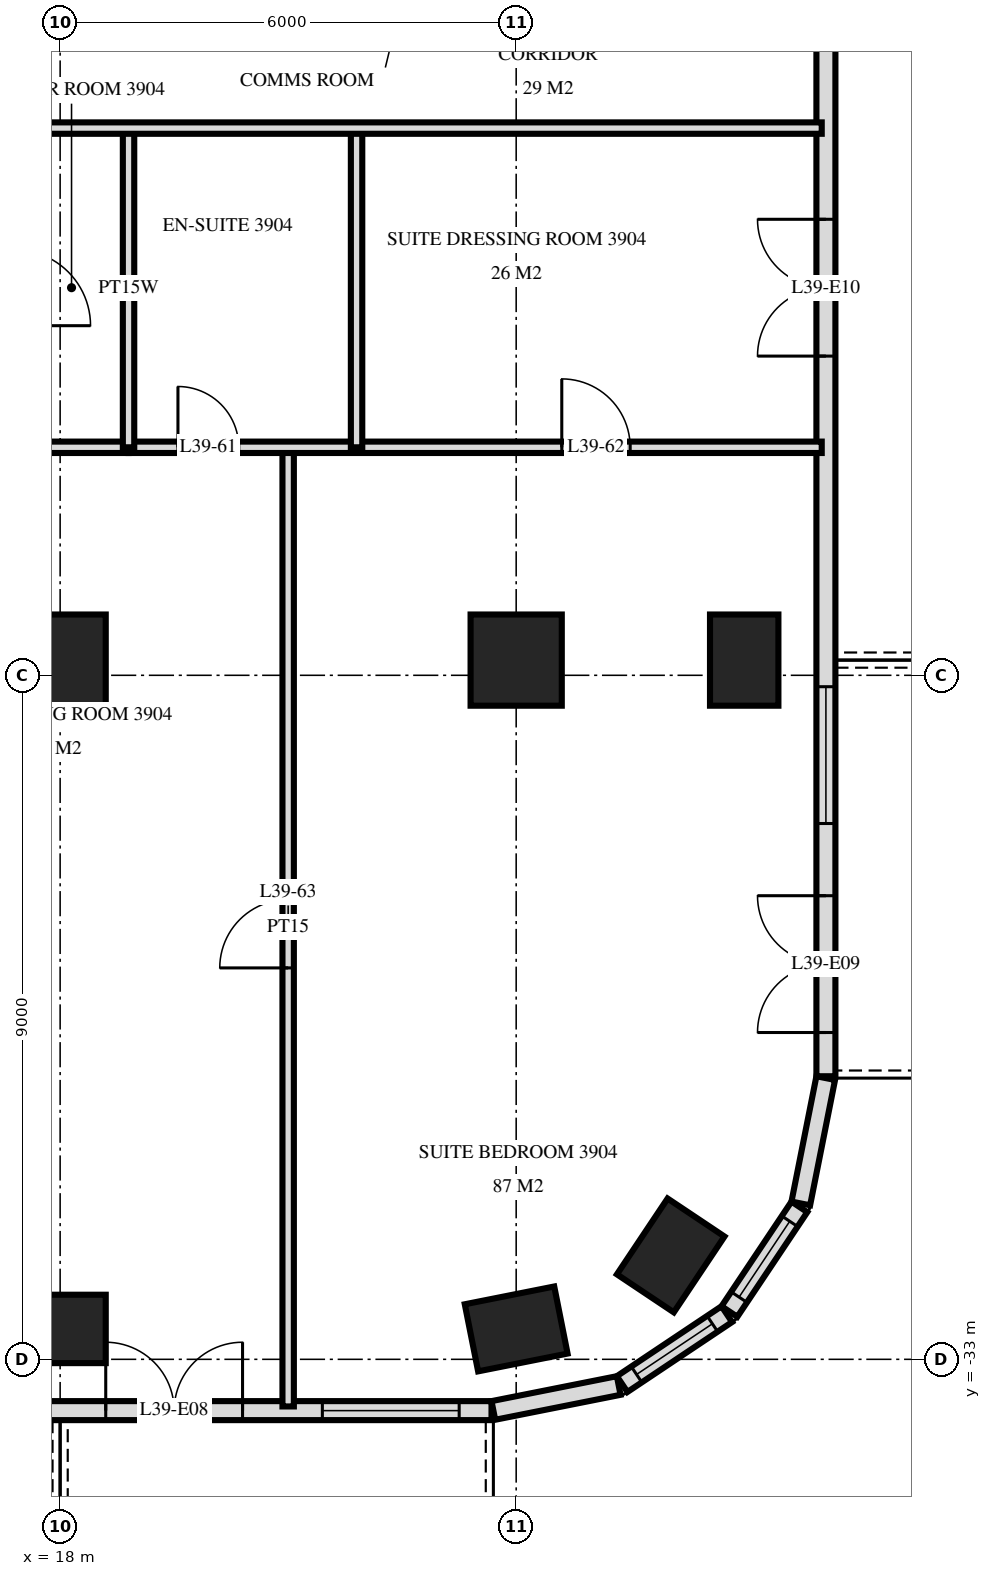
"""IFC4 building model, lengths in metres.
Left out: names, types, materials, properties, quantities, classifications, styles, units other than length and angle.
Written with IfcOpenShell. Run it as: python <this file> out.ifc"""

import sys

from ifc_helpers import new_model, si_unit, direction, frame, frame_2d, origin, origin_2d, place, context, subcontext, project, spatial, rectangle, extrude, element, fill, save


model = new_model("IFC4")
c1 = context("Model", 3, precision=1e-05, world=origin(), true_north=direction((0.0, 1.0)))
c2 = subcontext(c1, "Body", "Model", "MODEL_VIEW")
j1 = project(units=[si_unit("LENGTHUNIT", "METRE"), si_unit("PLANEANGLEUNIT", "RADIAN")], contexts=[c1])
p1 = place(None, origin())
s1 = spatial("IfcSite", under=j1, at=p1, CompositionType="ELEMENT")
p2 = place(p1, origin())
s2 = spatial("IfcBuilding", under=s1, at=p2, CompositionType="ELEMENT")
p3 = place(p2, frame((0.0, 0.0, 152.4)))
s3 = spatial("IfcBuildingStorey", under=s2, at=p3, CompositionType="ELEMENT", Elevation=152.4)
p4 = place(p3, frame((18.0, -32.6, 0.0), z_axis=(0.0, 0.0, 1.0), x_axis=(1.0, 0.0, 0.0)))
e1 = element("IfcColumn", 1, at=p4, inside=s3, PredefinedType="COLUMN", context=c2, shape_type="SweptSolid", body=[
    extrude(rectangle(XDim=1.2, YDim=0.9, at=origin_2d()), origin(), (0.0, 0.0, 1.0), 3.6),
])
p5 = place(p3, frame((18.0, -23.8, 0.0), z_axis=(0.0, 0.0, 1.0), x_axis=(1.0, 0.0, 0.0)))
e2 = element("IfcColumn", 2, at=p5, inside=s3, PredefinedType="COLUMN", context=c2, shape_type="SweptSolid", body=[
    extrude(rectangle(XDim=1.2, YDim=1.2, at=origin_2d()), origin(), (0.0, 0.0, 1.0), 3.6),
])
p6 = place(p3, frame((24.0, -32.6, 0.0), z_axis=(0.0, 0.0, 1.0), x_axis=(0.980792089743, 0.195056086032, 0.0)))
e3 = element("IfcColumn", 3, at=p6, inside=s3, PredefinedType="COLUMN", context=c2, shape_type="SweptSolid", body=[
    extrude(rectangle(XDim=1.2, YDim=0.9, at=origin_2d()), origin(), (0.0, 0.0, 1.0), 3.6),
])
p7 = place(p3, frame((24.0, -23.8, 0.0), z_axis=(0.0, 0.0, 1.0), x_axis=(1.0, 0.0, 0.0)))
e4 = element("IfcColumn", 4, at=p7, inside=s3, PredefinedType="COLUMN", context=c2, shape_type="SweptSolid", body=[
    extrude(rectangle(XDim=1.2, YDim=1.2, at=origin_2d()), origin(), (0.0, 0.0, 1.0), 3.6),
])
for number, where, z_axis, x_axis in (
    (5, (26.033, -31.633, 0.0), (0.0, 0.0, 1.0), (0.556, 0.831, 0.0)),
    (6, (27.0, -23.8, 0.0), (0.0, 0.0, 1.0), (0.0, 1.0, 0.0)),
):
    element("IfcColumn", number, at=place(p3, frame(where, z_axis=z_axis, x_axis=x_axis)), inside=s3, PredefinedType="COLUMN", context=c2, shape_type="SweptSolid", body=[
        extrude(rectangle(XDim=1.2, YDim=0.9, at=origin_2d()), origin(), (0.0, 0.0, 1.0), 3.6),
    ])
p8 = place(p3, frame((-23.675, -33.675, 0.0), z_axis=(0.0, 0.0, 1.0), x_axis=(1.0, 0.0, 0.0)))
e7 = element("IfcWall", 7, at=p8, inside=s3, PredefinedType="SOLIDWALL", context=c2, shape_type="SweptSolid", body=[
    extrude(rectangle(XDim=47.351, YDim=0.25, at=frame_2d((23.675, 0.0))), origin(), (0.0, 0.0, 1.0), 3.32),
])
p9 = place(p8, frame((3.425, 0.0, 0.0)))
e8 = element("IfcOpeningElement", 8, at=p9, cuts=e7, PredefinedType="OPENING", context=c2, shape_type="SweptSolid", body=[
    extrude(rectangle(XDim=1.8, YDim=2.4, at=frame_2d((0.9, 1.2))), frame((0.0, 0.135, 0.0), z_axis=(0.0, -1.0, 0.0), x_axis=(1.0, 0.0, 0.0)), (0.0, 0.0, 1.0), 0.27),
])
p10 = place(p8, frame((6.275, 0.0, 0.0)))
e9 = element("IfcOpeningElement", 9, at=p10, cuts=e7, PredefinedType="OPENING", context=c2, shape_type="SweptSolid", body=[
    extrude(rectangle(XDim=1.8, YDim=2.4, at=frame_2d((0.9, 1.2))), frame((0.0, 0.135, 0.0), z_axis=(0.0, -1.0, 0.0), x_axis=(1.0, 0.0, 0.0)), (0.0, 0.0, 1.0), 0.27),
])
p11 = place(p8, frame((8.975, 0.0, 0.3)))
e10 = element("IfcOpeningElement", 10, at=p11, cuts=e7, PredefinedType="OPENING", context=c2, shape_type="SweptSolid", body=[
    extrude(rectangle(XDim=2.4, YDim=2.1, at=frame_2d((1.2, 1.05))), frame((0.0, 0.135, 0.0), z_axis=(0.0, -1.0, 0.0), x_axis=(1.0, 0.0, 0.0)), (0.0, 0.0, 1.0), 0.27),
])
p12 = place(p8, frame((12.275, 0.0, 0.0)))
e11 = element("IfcOpeningElement", 11, at=p12, cuts=e7, PredefinedType="OPENING", context=c2, shape_type="SweptSolid", body=[
    extrude(rectangle(XDim=1.8, YDim=2.4, at=frame_2d((0.9, 1.2))), frame((0.0, 0.135, 0.0), z_axis=(0.0, -1.0, 0.0), x_axis=(1.0, 0.0, 0.0)), (0.0, 0.0, 1.0), 0.27),
])
p13 = place(p8, frame((14.975, 0.0, 0.3)))
e12 = element("IfcOpeningElement", 12, at=p13, cuts=e7, PredefinedType="OPENING", context=c2, shape_type="SweptSolid", body=[
    extrude(rectangle(XDim=2.4, YDim=2.1, at=frame_2d((1.2, 1.05))), frame((0.0, 0.135, 0.0), z_axis=(0.0, -1.0, 0.0), x_axis=(1.0, 0.0, 0.0)), (0.0, 0.0, 1.0), 0.27),
])
p14 = place(p8, frame((21.275, 0.0, 0.0)))
e13 = element("IfcOpeningElement", 13, at=p14, cuts=e7, PredefinedType="OPENING", context=c2, shape_type="SweptSolid", body=[
    extrude(rectangle(XDim=1.8, YDim=2.4, at=frame_2d((0.9, 1.2))), frame((0.0, 0.135, 0.0), z_axis=(0.0, -1.0, 0.0), x_axis=(1.0, 0.0, 0.0)), (0.0, 0.0, 1.0), 0.27),
])
p15 = place(p8, frame((24.275, 0.0, 0.0)))
e14 = element("IfcOpeningElement", 14, at=p15, cuts=e7, PredefinedType="OPENING", context=c2, shape_type="SweptSolid", body=[
    extrude(rectangle(XDim=1.8, YDim=2.4, at=frame_2d((0.9, 1.2))), frame((0.0, 0.135, 0.0), z_axis=(0.0, -1.0, 0.0), x_axis=(1.0, 0.0, 0.0)), (0.0, 0.0, 1.0), 0.27),
])
p16 = place(p8, frame((30.275, 0.0, 0.0)))
e15 = element("IfcOpeningElement", 15, at=p16, cuts=e7, PredefinedType="OPENING", context=c2, shape_type="SweptSolid", body=[
    extrude(rectangle(XDim=1.8, YDim=2.4, at=frame_2d((0.9, 1.2))), frame((0.0, 0.135, 0.0), z_axis=(0.0, -1.0, 0.0), x_axis=(1.0, 0.0, 0.0)), (0.0, 0.0, 1.0), 0.27),
])
p17 = place(p8, frame((32.975, 0.0, 0.3)))
e16 = element("IfcOpeningElement", 16, at=p17, cuts=e7, PredefinedType="OPENING", context=c2, shape_type="SweptSolid", body=[
    extrude(rectangle(XDim=2.4, YDim=2.1, at=frame_2d((1.2, 1.05))), frame((0.0, 0.135, 0.0), z_axis=(0.0, -1.0, 0.0), x_axis=(1.0, 0.0, 0.0)), (0.0, 0.0, 1.0), 0.27),
])
p18 = place(p8, frame((36.275, 0.0, 0.0)))
e17 = element("IfcOpeningElement", 17, at=p18, cuts=e7, PredefinedType="OPENING", context=c2, shape_type="SweptSolid", body=[
    extrude(rectangle(XDim=1.8, YDim=2.4, at=frame_2d((0.9, 1.2))), frame((0.0, 0.135, 0.0), z_axis=(0.0, -1.0, 0.0), x_axis=(1.0, 0.0, 0.0)), (0.0, 0.0, 1.0), 0.27),
])
p19 = place(p8, frame((38.975, 0.0, 0.3)))
e18 = element("IfcOpeningElement", 18, at=p19, cuts=e7, PredefinedType="OPENING", context=c2, shape_type="SweptSolid", body=[
    extrude(rectangle(XDim=2.4, YDim=2.1, at=frame_2d((1.2, 1.05))), frame((0.0, 0.135, 0.0), z_axis=(0.0, -1.0, 0.0), x_axis=(1.0, 0.0, 0.0)), (0.0, 0.0, 1.0), 0.27),
])
p20 = place(p8, frame((42.275, 0.0, 0.0)))
e19 = element("IfcOpeningElement", 19, at=p20, cuts=e7, PredefinedType="OPENING", context=c2, shape_type="SweptSolid", body=[
    extrude(rectangle(XDim=1.8, YDim=2.4, at=frame_2d((0.9, 1.2))), frame((0.0, 0.135, 0.0), z_axis=(0.0, -1.0, 0.0), x_axis=(1.0, 0.0, 0.0)), (0.0, 0.0, 1.0), 0.27),
])
p21 = place(p8, frame((45.125, 0.0, 0.3)))
e20 = element("IfcOpeningElement", 20, at=p21, cuts=e7, PredefinedType="OPENING", context=c2, shape_type="SweptSolid", body=[
    extrude(rectangle(XDim=1.8, YDim=2.1, at=frame_2d((0.9, 1.05))), frame((0.0, 0.135, 0.0), z_axis=(0.0, -1.0, 0.0), x_axis=(1.0, 0.0, 0.0)), (0.0, 0.0, 1.0), 0.27),
])
p22 = place(p3, frame((23.7, -33.673, 0.0), z_axis=(0.0, 0.0, 1.0), x_axis=(0.980775640221, 0.19513878023, 0.0)))
e21 = element("IfcWall", 21, at=p22, inside=s3, PredefinedType="SOLIDWALL", context=c2, shape_type="SweptSolid", body=[
    extrude(rectangle(XDim=1.681, YDim=0.25, at=frame_2d((0.841, 0.0))), origin(), (0.0, 0.0, 1.0), 3.32),
])
p23 = place(p3, frame((25.394, -33.326, 0.0), z_axis=(0.0, 0.0, 1.0), x_axis=(0.831482937015, 0.55555029066, 0.0)))
e22 = element("IfcWall", 22, at=p23, inside=s3, PredefinedType="SOLIDWALL", context=c2, shape_type="SweptSolid", body=[
    extrude(rectangle(XDim=1.656, YDim=0.25, at=frame_2d((0.828, 0.0))), origin(), (0.0, 0.0, 1.0), 3.32),
])
p24 = place(p23, frame((0.228, 0.0, 0.9)))
e23 = element("IfcOpeningElement", 23, at=p24, cuts=e22, PredefinedType="OPENING", context=c2, shape_type="SweptSolid", body=[
    extrude(rectangle(XDim=1.2, YDim=1.5, at=frame_2d((0.6, 0.75))), frame((0.0, 0.135, 0.0), z_axis=(0.0, -1.0, 0.0), x_axis=(1.0, 0.0, 0.0)), (0.0, 0.0, 1.0), 0.27),
])
p25 = place(p3, frame((26.806, -32.371, 0.0), z_axis=(0.0, 0.0, 1.0), x_axis=(0.55555029066, 0.831482937015, 0.0)))
e24 = element("IfcWall", 24, at=p25, inside=s3, PredefinedType="SOLIDWALL", context=c2, shape_type="SweptSolid", body=[
    extrude(rectangle(XDim=1.656, YDim=0.25, at=frame_2d((0.828, 0.0))), origin(), (0.0, 0.0, 1.0), 3.32),
])
p26 = place(p25, frame((0.228, 0.0, 0.9)))
e25 = element("IfcOpeningElement", 25, at=p26, cuts=e24, PredefinedType="OPENING", context=c2, shape_type="SweptSolid", body=[
    extrude(rectangle(XDim=1.2, YDim=1.5, at=frame_2d((0.6, 0.75))), frame((0.0, 0.135, 0.0), z_axis=(0.0, -1.0, 0.0), x_axis=(1.0, 0.0, 0.0)), (0.0, 0.0, 1.0), 0.27),
])
p27 = place(p3, frame((27.745, -30.949, 0.0), z_axis=(0.0, 0.0, 1.0), x_axis=(0.194999110559, 0.980803419081, 0.0)))
e26 = element("IfcWall", 26, at=p27, inside=s3, PredefinedType="SOLIDWALL", context=c2, shape_type="SweptSolid", body=[
    extrude(rectangle(XDim=1.681, YDim=0.25, at=frame_2d((0.841, 0.0))), origin(), (0.0, 0.0, 1.0), 3.32),
])
p28 = place(p3, frame((28.075, -29.275, 0.0), z_axis=(0.0, 0.0, 1.0), x_axis=(0.0, 1.0, 0.0)))
e27 = element("IfcWall", 27, at=p28, inside=s3, PredefinedType="SOLIDWALL", context=c2, shape_type="SweptSolid", body=[
    extrude(rectangle(XDim=25.951, YDim=0.25, at=frame_2d((12.975, 0.0))), origin(), (0.0, 0.0, 1.0), 3.32),
])
p29 = place(p28, frame((0.575, 0.0, 0.0)))
e28 = element("IfcOpeningElement", 28, at=p29, cuts=e27, PredefinedType="OPENING", context=c2, shape_type="SweptSolid", body=[
    extrude(rectangle(XDim=1.8, YDim=2.4, at=frame_2d((0.9, 1.2))), frame((0.0, 0.135, 0.0), z_axis=(0.0, -1.0, 0.0), x_axis=(1.0, 0.0, 0.0)), (0.0, 0.0, 1.0), 0.27),
])
p30 = place(p28, frame((3.325, 0.0, 0.3)))
e29 = element("IfcOpeningElement", 29, at=p30, cuts=e27, PredefinedType="OPENING", context=c2, shape_type="SweptSolid", body=[
    extrude(rectangle(XDim=1.8, YDim=2.1, at=frame_2d((0.9, 1.05))), frame((0.0, 0.135, 0.0), z_axis=(0.0, -1.0, 0.0), x_axis=(1.0, 0.0, 0.0)), (0.0, 0.0, 1.0), 0.27),
])
p31 = place(p28, frame((9.475, 0.0, 0.0)))
e30 = element("IfcOpeningElement", 30, at=p31, cuts=e27, PredefinedType="OPENING", context=c2, shape_type="SweptSolid", body=[
    extrude(rectangle(XDim=1.8, YDim=2.4, at=frame_2d((0.9, 1.2))), frame((0.0, 0.135, 0.0), z_axis=(0.0, -1.0, 0.0), x_axis=(1.0, 0.0, 0.0)), (0.0, 0.0, 1.0), 0.27),
])
p32 = place(p28, frame((14.575, 0.0, 0.3)))
e31 = element("IfcOpeningElement", 31, at=p32, cuts=e27, PredefinedType="OPENING", context=c2, shape_type="SweptSolid", body=[
    extrude(rectangle(XDim=2.4, YDim=2.1, at=frame_2d((1.2, 1.05))), frame((0.0, 0.135, 0.0), z_axis=(0.0, -1.0, 0.0), x_axis=(1.0, 0.0, 0.0)), (0.0, 0.0, 1.0), 0.27),
])
p33 = place(p28, frame((17.875, 0.0, 0.0)))
e32 = element("IfcOpeningElement", 32, at=p33, cuts=e27, PredefinedType="OPENING", context=c2, shape_type="SweptSolid", body=[
    extrude(rectangle(XDim=1.8, YDim=2.4, at=frame_2d((0.9, 1.2))), frame((0.0, 0.135, 0.0), z_axis=(0.0, -1.0, 0.0), x_axis=(1.0, 0.0, 0.0)), (0.0, 0.0, 1.0), 0.27),
])
p34 = place(p3, frame((21.9, -21.0, 0.0), z_axis=(0.0, 0.0, 1.0), x_axis=(0.0, 1.0, 0.0)))
e33 = element("IfcWall", 33, at=p34, inside=s3, PredefinedType="PARTITIONING", context=c2, shape_type="SweptSolid", body=[
    extrude(rectangle(XDim=4.2, YDim=0.15, at=frame_2d((2.1, 0.0))), origin(), (0.0, 0.0, 1.0), 3.32),
])
p35 = place(p3, frame((21.0, -33.62, 0.0), z_axis=(0.0, 0.0, 1.0), x_axis=(0.0, 1.0, 0.0)))
e34 = element("IfcWall", 34, at=p35, inside=s3, PredefinedType="PARTITIONING", context=c2, shape_type="SweptSolid", body=[
    extrude(rectangle(XDim=12.62, YDim=0.15, at=frame_2d((6.31, 0.0))), origin(), (0.0, 0.0, 1.0), 3.32),
])
p36 = place(p35, frame((5.77, 0.0, 0.0)))
e35 = element("IfcOpeningElement", 35, at=p36, cuts=e34, PredefinedType="OPENING", context=c2, shape_type="SweptSolid", body=[
    extrude(rectangle(XDim=0.9, YDim=2.1, at=frame_2d((0.45, 1.05))), frame((0.0, 0.085, 0.0), z_axis=(0.0, -1.0, 0.0), x_axis=(1.0, 0.0, 0.0)), (0.0, 0.0, 1.0), 0.17),
])
p37 = place(p3, frame((18.9, -21.0, 0.0), z_axis=(0.0, 0.0, 1.0), x_axis=(0.0, 1.0, 0.0)))
e36 = element("IfcWall", 36, at=p37, inside=s3, PredefinedType="PLUMBINGWALL", context=c2, shape_type="SweptSolid", body=[
    extrude(rectangle(XDim=4.2, YDim=0.15, at=frame_2d((2.1, 0.0))), origin(), (0.0, 0.0, 1.0), 3.32),
])
p38 = place(p3, frame((18.9, -21.0, 0.0), z_axis=(0.0, 0.0, 1.0), x_axis=(1.0, 0.0, 0.0)))
e37 = element("IfcWall", 37, at=p38, inside=s3, PredefinedType="PARTITIONING", context=c2, shape_type="SweptSolid", body=[
    extrude(rectangle(XDim=9.12, YDim=0.15, at=frame_2d((4.56, 0.0))), origin(), (0.0, 0.0, 1.0), 3.32),
])
p39 = place(p38, frame((0.65, 0.0, 0.0)))
e38 = element("IfcOpeningElement", 38, at=p39, cuts=e37, PredefinedType="OPENING", context=c2, shape_type="SweptSolid", body=[
    extrude(rectangle(XDim=0.8, YDim=2.1, at=frame_2d((0.4, 1.05))), frame((0.0, 0.085, 0.0), z_axis=(0.0, -1.0, 0.0), x_axis=(1.0, 0.0, 0.0)), (0.0, 0.0, 1.0), 0.17),
])
p40 = place(p38, frame((5.7, 0.0, 0.0)))
e39 = element("IfcOpeningElement", 39, at=p40, cuts=e37, PredefinedType="OPENING", context=c2, shape_type="SweptSolid", body=[
    extrude(rectangle(XDim=0.9, YDim=2.1, at=frame_2d((0.45, 1.05))), frame((0.0, 0.085, 0.0), z_axis=(0.0, -1.0, 0.0), x_axis=(1.0, 0.0, 0.0)), (0.0, 0.0, 1.0), 0.17),
])
p41 = place(p3, frame((17.4, -21.0, 0.0), z_axis=(0.0, 0.0, 1.0), x_axis=(1.0, 0.0, 0.0)))
e40 = element("IfcWall", 40, at=p41, inside=s3, PredefinedType="PLUMBINGWALL", context=c2, shape_type="SweptSolid", body=[
    extrude(rectangle(XDim=1.5, YDim=0.15, at=frame_2d((0.75, 0.0))), origin(), (0.0, 0.0, 1.0), 3.32),
])
p42 = place(p3, frame((-28.02, -16.8, 0.0), z_axis=(0.0, 0.0, 1.0), x_axis=(1.0, 0.0, 0.0)))
e41 = element("IfcWall", 41, at=p42, inside=s3, PredefinedType="PARTITIONING", context=c2, shape_type="SweptSolid", body=[
    extrude(rectangle(XDim=56.04, YDim=0.15, at=frame_2d((28.02, 0.0))), origin(), (0.0, 0.0, 1.0), 3.32),
])
p43 = place(p42, frame((13.17, 0.0, 0.0)))
e42 = element("IfcOpeningElement", 42, at=p43, cuts=e41, PredefinedType="OPENING", context=c2, shape_type="SweptSolid", body=[
    extrude(rectangle(XDim=1.0, YDim=2.1, at=frame_2d((0.5, 1.05))), frame((0.0, 0.085, 0.0), z_axis=(0.0, -1.0, 0.0), x_axis=(1.0, 0.0, 0.0)), (0.0, 0.0, 1.0), 0.17),
])
p44 = place(p42, frame((11.32, 0.0, 0.0)))
e43 = element("IfcOpeningElement", 43, at=p44, cuts=e41, PredefinedType="OPENING", context=c2, shape_type="SweptSolid", body=[
    extrude(rectangle(XDim=1.0, YDim=2.1, at=frame_2d((0.5, 1.05))), frame((0.0, 0.085, 0.0), z_axis=(0.0, -1.0, 0.0), x_axis=(1.0, 0.0, 0.0)), (0.0, 0.0, 1.0), 0.17),
])
p45 = place(p42, frame((41.87, 0.0, 0.0)))
e44 = element("IfcOpeningElement", 44, at=p45, cuts=e41, PredefinedType="OPENING", context=c2, shape_type="SweptSolid", body=[
    extrude(rectangle(XDim=1.0, YDim=2.1, at=frame_2d((0.5, 1.05))), frame((0.0, 0.085, 0.0), z_axis=(0.0, -1.0, 0.0), x_axis=(1.0, 0.0, 0.0)), (0.0, 0.0, 1.0), 0.17),
])
p46 = place(p42, frame((43.72, 0.0, 0.0)))
e45 = element("IfcOpeningElement", 45, at=p46, cuts=e41, PredefinedType="OPENING", context=c2, shape_type="SweptSolid", body=[
    extrude(rectangle(XDim=1.0, YDim=2.1, at=frame_2d((0.5, 1.05))), frame((0.0, 0.085, 0.0), z_axis=(0.0, -1.0, 0.0), x_axis=(1.0, 0.0, 0.0)), (0.0, 0.0, 1.0), 0.17),
])
p47 = place(p42, frame((19.52, 0.0, 0.0)))
e46 = element("IfcOpeningElement", 46, at=p47, cuts=e41, PredefinedType="OPENING", context=c2, shape_type="SweptSolid", body=[
    extrude(rectangle(XDim=1.0, YDim=2.1, at=frame_2d((0.5, 1.05))), frame((0.0, 0.085, 0.0), z_axis=(0.0, -1.0, 0.0), x_axis=(1.0, 0.0, 0.0)), (0.0, 0.0, 1.0), 0.17),
])
p48 = place(p42, frame((27.52, 0.0, 0.0)))
e47 = element("IfcOpeningElement", 47, at=p48, cuts=e41, PredefinedType="OPENING", context=c2, shape_type="SweptSolid", body=[
    extrude(rectangle(XDim=1.0, YDim=2.1, at=frame_2d((0.5, 1.05))), frame((0.0, 0.085, 0.0), z_axis=(0.0, -1.0, 0.0), x_axis=(1.0, 0.0, 0.0)), (0.0, 0.0, 1.0), 0.17),
])
p49 = place(p42, frame((35.52, 0.0, 0.0)))
e48 = element("IfcOpeningElement", 48, at=p49, cuts=e41, PredefinedType="OPENING", context=c2, shape_type="SweptSolid", body=[
    extrude(rectangle(XDim=1.0, YDim=2.1, at=frame_2d((0.5, 1.05))), frame((0.0, 0.085, 0.0), z_axis=(0.0, -1.0, 0.0), x_axis=(1.0, 0.0, 0.0)), (0.0, 0.0, 1.0), 0.17),
])
p50 = place(p24, origin())
e49 = element("IfcWindow", 49, at=p50, inside=s3, PartitioningType="SINGLE_PANEL", PredefinedType="WINDOW", context=c2, shape_type="SweptSolid", body=[
    extrude(rectangle(XDim=1.2, YDim=1.5, at=frame_2d((0.6, 0.75))), frame((0.0, 0.03, 0.0), z_axis=(0.0, -1.0, 0.0), x_axis=(1.0, 0.0, 0.0)), (0.0, 0.0, 1.0), 0.06),
])
fill(e23, e49)
p51 = place(p26, origin())
e50 = element("IfcWindow", 50, at=p51, inside=s3, PartitioningType="SINGLE_PANEL", PredefinedType="WINDOW", context=c2, shape_type="SweptSolid", body=[
    extrude(rectangle(XDim=1.2, YDim=1.5, at=frame_2d((0.6, 0.75))), frame((0.0, 0.03, 0.0), z_axis=(0.0, -1.0, 0.0), x_axis=(1.0, 0.0, 0.0)), (0.0, 0.0, 1.0), 0.06),
])
fill(e25, e50)
p52 = place(p20, origin())
e51 = element("IfcDoor", 51, at=p52, inside=s3, OperationType="DOUBLE_DOOR_SINGLE_SWING", PredefinedType="DOOR", context=c2, shape_type="SweptSolid", body=[
    extrude(rectangle(XDim=1.8, YDim=2.4, at=frame_2d((0.9, 1.2))), frame((0.0, 0.025, 0.0), z_axis=(0.0, -1.0, 0.0), x_axis=(1.0, 0.0, 0.0)), (0.0, 0.0, 1.0), 0.05),
])
fill(e19, e51)
p53 = place(p21, origin())
e52 = element("IfcWindow", 52, at=p53, inside=s3, PartitioningType="SINGLE_PANEL", PredefinedType="WINDOW", context=c2, shape_type="SweptSolid", body=[
    extrude(rectangle(XDim=1.8, YDim=2.1, at=frame_2d((0.9, 1.05))), frame((0.0, 0.03, 0.0), z_axis=(0.0, -1.0, 0.0), x_axis=(1.0, 0.0, 0.0)), (0.0, 0.0, 1.0), 0.06),
])
fill(e20, e52)
p54 = place(p29, origin())
e53 = element("IfcDoor", 53, at=p54, inside=s3, OperationType="DOUBLE_DOOR_SINGLE_SWING", PredefinedType="DOOR", context=c2, shape_type="SweptSolid", body=[
    extrude(rectangle(XDim=1.8, YDim=2.4, at=frame_2d((0.9, 1.2))), frame((0.0, 0.025, 0.0), z_axis=(0.0, -1.0, 0.0), x_axis=(1.0, 0.0, 0.0)), (0.0, 0.0, 1.0), 0.05),
])
fill(e28, e53)
p55 = place(p30, origin())
e54 = element("IfcWindow", 54, at=p55, inside=s3, PartitioningType="SINGLE_PANEL", PredefinedType="WINDOW", context=c2, shape_type="SweptSolid", body=[
    extrude(rectangle(XDim=1.8, YDim=2.1, at=frame_2d((0.9, 1.05))), frame((0.0, 0.03, 0.0), z_axis=(0.0, -1.0, 0.0), x_axis=(1.0, 0.0, 0.0)), (0.0, 0.0, 1.0), 0.06),
])
fill(e29, e54)
p56 = place(p31, origin())
e55 = element("IfcDoor", 55, at=p56, inside=s3, OperationType="DOUBLE_DOOR_SINGLE_SWING", PredefinedType="DOOR", context=c2, shape_type="SweptSolid", body=[
    extrude(rectangle(XDim=1.8, YDim=2.4, at=frame_2d((0.9, 1.2))), frame((0.0, 0.025, 0.0), z_axis=(0.0, -1.0, 0.0), x_axis=(1.0, 0.0, 0.0)), (0.0, 0.0, 1.0), 0.05),
])
fill(e30, e55)
p57 = place(p39, origin())
e56 = element("IfcDoor", 56, at=p57, inside=s3, OperationType="SINGLE_SWING_RIGHT", PredefinedType="DOOR", context=c2, shape_type="SweptSolid", body=[
    extrude(rectangle(XDim=0.8, YDim=2.1, at=frame_2d((0.4, 1.05))), frame((0.0, 0.025, 0.0), z_axis=(0.0, -1.0, 0.0), x_axis=(1.0, 0.0, 0.0)), (0.0, 0.0, 1.0), 0.05),
])
fill(e38, e56)
p58 = place(p40, origin())
e57 = element("IfcDoor", 57, at=p58, inside=s3, OperationType="SINGLE_SWING_RIGHT", PredefinedType="DOOR", context=c2, shape_type="SweptSolid", body=[
    extrude(rectangle(XDim=0.9, YDim=2.1, at=frame_2d((0.45, 1.05))), frame((0.0, 0.025, 0.0), z_axis=(0.0, -1.0, 0.0), x_axis=(1.0, 0.0, 0.0)), (0.0, 0.0, 1.0), 0.05),
])
fill(e39, e57)
p59 = place(p36, origin())
e58 = element("IfcDoor", 58, at=p59, inside=s3, OperationType="SINGLE_SWING_RIGHT", PredefinedType="DOOR", context=c2, shape_type="SweptSolid", body=[
    extrude(rectangle(XDim=0.9, YDim=2.1, at=frame_2d((0.45, 1.05))), frame((0.0, 0.025, 0.0), z_axis=(0.0, -1.0, 0.0), x_axis=(1.0, 0.0, 0.0)), (0.0, 0.0, 1.0), 0.05),
])
fill(e35, e58)
save(model, sys.argv[1])
